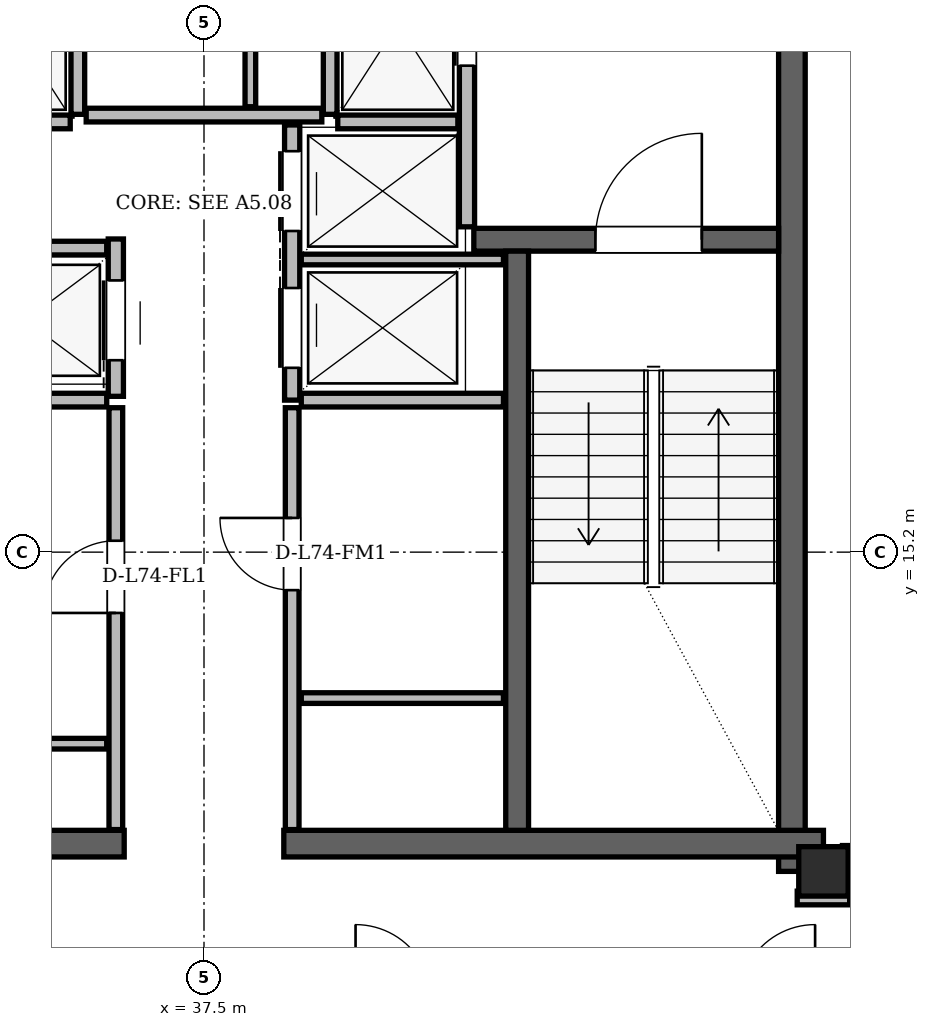
"""IFC4 building model, lengths in metres.
Left out: names, types, materials, properties, quantities, classifications, styles, units other than length and angle.
Written with IfcOpenShell. Run it as: python <this file> out.ifc"""

import sys

from ifc_helpers import new_model, si_unit, direction, frame, frame_2d, origin, origin_2d, place, context, subcontext, project, spatial, rectangle, hollow_rectangle, extrude, element, fill, save


model = new_model("IFC4")
c1 = context("Model", 3, precision=1e-05, world=origin(), true_north=direction((0.0, 1.0)))
c2 = subcontext(c1, "Body", "Model", "MODEL_VIEW")
j1 = project(units=[si_unit("LENGTHUNIT", "METRE"), si_unit("PLANEANGLEUNIT", "RADIAN")], contexts=[c1])
p1 = place(None, origin())
s1 = spatial("IfcSite", under=j1, at=p1, CompositionType="ELEMENT")
p2 = place(p1, origin())
s2 = spatial("IfcBuilding", under=s1, at=p2, CompositionType="ELEMENT")
p3 = place(p2, frame((0.0, 0.0, 281.1)))
s3 = spatial("IfcBuildingStorey", under=s2, at=p3, CompositionType="ELEMENT", Elevation=281.1)
p4 = place(p3, frame((45.65, 11.0, 0.0), z_axis=(0.0, 0.0, 1.0), x_axis=(1.0, 0.0, 0.0)))
e1 = element("IfcColumn", 1, at=p4, inside=s3, PredefinedType="COLUMN", context=c2, shape_type="SweptSolid", body=[
    extrude(hollow_rectangle(XDim=0.65, YDim=0.65, WallThickness=0.05, at=origin_2d()), origin(), (0.0, 0.0, 1.0), 3.9),
])
p5 = place(p3, frame((45.235, 11.0, 0.0), z_axis=(0.0, 0.0, 1.0), x_axis=(0.0, 1.0, 0.0)))
e2 = element("IfcWall", 2, at=p5, inside=s3, PredefinedType="SHEAR", context=c2, shape_type="SweptSolid", body=[
    extrude(rectangle(XDim=13.3, YDim=0.35, at=frame_2d((6.65, 0.0))), origin(), (0.0, 0.0, 1.0), 3.68),
])
for number, where, z_axis, x_axis in (
    (3, (29.35, 11.365, 0.0), (0.0, 0.0, 1.0), (1.0, 0.0, 0.0)),
    (4, (38.55, 11.365, 0.0), (0.0, 0.0, 1.0), (1.0, 0.0, 0.0)),
):
    element("IfcWall", number, at=place(p3, frame(where, z_axis=z_axis, x_axis=x_axis)), inside=s3, PredefinedType="SHEAR", context=c2, shape_type="SweptSolid", body=[
        extrude(rectangle(XDim=7.1, YDim=0.35, at=frame_2d((3.55, 0.0))), origin(), (0.0, 0.0, 1.0), 3.68),
    ])
p6 = place(p3, frame((41.05, 19.31, 0.0), z_axis=(0.0, 0.0, 1.0), x_axis=(1.0, 0.0, 0.0)))
e5 = element("IfcWall", 5, at=p6, inside=s3, PredefinedType="SHEAR", context=c2, shape_type="SweptSolid", body=[
    extrude(rectangle(XDim=4.01, YDim=0.3, at=frame_2d((2.005, 0.0))), origin(), (0.0, 0.0, 1.0), 3.68),
])
p7 = place(p6, frame((1.6, 0.0, 0.0)))
e6 = element("IfcOpeningElement", 6, at=p7, cuts=e5, PredefinedType="OPENING", context=c2, shape_type="SweptSolid", body=[
    extrude(rectangle(XDim=1.4, YDim=2.2, at=frame_2d((0.7, 1.1))), frame((0.0, 0.15, 0.0), z_axis=(0.0, -1.0, 0.0), x_axis=(1.0, 0.0, 0.0)), (0.0, 0.0, 1.0), 0.3),
])
p8 = place(p3, frame((41.62, 11.54, 0.0), z_axis=(0.0, 0.0, 1.0), x_axis=(0.0, 1.0, 0.0)))
e7 = element("IfcWall", 7, at=p8, inside=s3, PredefinedType="SHEAR", context=c2, shape_type="SweptSolid", body=[
    extrude(rectangle(XDim=7.62, YDim=0.3, at=frame_2d((3.81, 0.0))), origin(), (0.0, 0.0, 1.0), 3.68),
])
p9 = place(p3, frame((58.454, 10.584, 0.0), z_axis=(0.0, 0.0, 1.0), x_axis=(-0.500002460556, 0.866023983177, 0.0)))
e8 = element("IfcWall", 8, at=p9, inside=s3, PredefinedType="SOLIDWALL", context=c2, shape_type="SweptSolid", body=[
    extrude(rectangle(XDim=37.435, YDim=0.29, at=frame_2d((18.718, 0.0))), origin(), (0.0, 0.0, 1.0), 3.058),
])
p10 = place(p9, frame((3.639, 0.0, 0.0)))
e9 = element("IfcOpeningElement", 9, at=p10, cuts=e8, PredefinedType="OPENING", context=c2, shape_type="SweptSolid", body=[
    extrude(rectangle(XDim=1.5, YDim=2.2, at=frame_2d((0.75, 1.1))), frame((0.0, 0.145, 0.0), z_axis=(0.0, -1.0, 0.0), x_axis=(1.0, 0.0, 0.0)), (0.0, 0.0, 1.0), 0.29),
])
p11 = place(p9, frame((27.901, 0.0, 0.0)))
e10 = element("IfcOpeningElement", 10, at=p11, cuts=e8, PredefinedType="OPENING", context=c2, shape_type="SweptSolid", body=[
    extrude(rectangle(XDim=1.5, YDim=2.2, at=frame_2d((0.75, 1.1))), frame((0.0, 0.145, 0.0), z_axis=(0.0, -1.0, 0.0), x_axis=(1.0, 0.0, 0.0)), (0.0, 0.0, 1.0), 0.29),
])
p12 = place(p9, frame((0.782, 0.0, 0.85)))
e11 = element("IfcOpeningElement", 11, at=p12, cuts=e8, PredefinedType="OPENING", context=c2, shape_type="SweptSolid", body=[
    extrude(rectangle(XDim=1.2, YDim=1.48, at=frame_2d((0.6, 0.74))), frame((0.0, 0.145, 0.0), z_axis=(0.0, -1.0, 0.0), x_axis=(1.0, 0.0, 0.0)), (0.0, 0.0, 1.0), 0.29),
])
p13 = place(p9, frame((7.149, 0.0, 0.85)))
e12 = element("IfcOpeningElement", 12, at=p13, cuts=e8, PredefinedType="OPENING", context=c2, shape_type="SweptSolid", body=[
    extrude(rectangle(XDim=2.4, YDim=1.9, at=frame_2d((1.2, 0.95))), frame((0.0, 0.145, 0.0), z_axis=(0.0, -1.0, 0.0), x_axis=(1.0, 0.0, 0.0)), (0.0, 0.0, 1.0), 0.29),
])
p14 = place(p9, frame((35.38, 0.0, 0.85)))
e13 = element("IfcOpeningElement", 13, at=p14, cuts=e8, PredefinedType="OPENING", context=c2, shape_type="SweptSolid", body=[
    extrude(rectangle(XDim=1.2, YDim=1.48, at=frame_2d((0.6, 0.74))), frame((0.0, 0.145, 0.0), z_axis=(0.0, -1.0, 0.0), x_axis=(1.0, 0.0, 0.0)), (0.0, 0.0, 1.0), 0.29),
])
p15 = place(p9, frame((16.994, 0.0, 0.85)))
e14 = element("IfcOpeningElement", 14, at=p15, cuts=e8, PredefinedType="OPENING", context=c2, shape_type="SweptSolid", body=[
    extrude(rectangle(XDim=1.2, YDim=1.48, at=frame_2d((0.6, 0.74))), frame((0.0, 0.145, 0.0), z_axis=(0.0, -1.0, 0.0), x_axis=(1.0, 0.0, 0.0)), (0.0, 0.0, 1.0), 0.29),
])
p16 = place(p9, frame((19.423, 0.0, 0.85)))
e15 = element("IfcOpeningElement", 15, at=p16, cuts=e8, PredefinedType="OPENING", context=c2, shape_type="SweptSolid", body=[
    extrude(rectangle(XDim=1.8, YDim=1.75, at=frame_2d((0.9, 0.875))), frame((0.0, 0.145, 0.0), z_axis=(0.0, -1.0, 0.0), x_axis=(1.0, 0.0, 0.0)), (0.0, 0.0, 1.0), 0.29),
])
p17 = place(p9, frame((22.626, 0.0, 0.85)))
e16 = element("IfcOpeningElement", 16, at=p17, cuts=e8, PredefinedType="OPENING", context=c2, shape_type="SweptSolid", body=[
    extrude(rectangle(XDim=2.2, YDim=1.85, at=frame_2d((1.1, 0.925))), frame((0.0, 0.145, 0.0), z_axis=(0.0, -1.0, 0.0), x_axis=(1.0, 0.0, 0.0)), (0.0, 0.0, 1.0), 0.29),
])
p18 = place(p9, frame((14.598, 0.0, 0.85)))
e17 = element("IfcOpeningElement", 17, at=p18, cuts=e8, PredefinedType="OPENING", context=c2, shape_type="SweptSolid", body=[
    extrude(rectangle(XDim=1.2, YDim=1.48, at=frame_2d((0.6, 0.74))), frame((0.0, 0.145, 0.0), z_axis=(0.0, -1.0, 0.0), x_axis=(1.0, 0.0, 0.0)), (0.0, 0.0, 1.0), 0.29),
])
p19 = place(p3, frame((35.84, 20.96, 0.0), z_axis=(0.0, 0.0, 1.0), x_axis=(0.0, 1.0, 0.0)))
e18 = element("IfcWall", 18, at=p19, inside=s3, PredefinedType="PARTITIONING", context=c2, shape_type="SweptSolid", body=[
    extrude(rectangle(XDim=3.02, YDim=0.18, at=frame_2d((1.51, 0.0))), origin(), (0.0, 0.0, 1.0), 3.68),
])
p20 = place(p3, frame((34.16, 20.86, 0.0), z_axis=(0.0, 0.0, 1.0), x_axis=(1.0, 0.0, 0.0)))
e19 = element("IfcWall", 19, at=p20, inside=s3, PredefinedType="PARTITIONING", context=c2, shape_type="SweptSolid", body=[
    extrude(rectangle(XDim=1.58, YDim=0.18, at=frame_2d((0.79, 0.0))), origin(), (0.0, 0.0, 1.0), 3.68),
])
p21 = place(p3, frame((40.96, 19.48, 0.0), z_axis=(0.0, 0.0, 1.0), x_axis=(0.0, 1.0, 0.0)))
e20 = element("IfcWall", 20, at=p21, inside=s3, PredefinedType="PARTITIONING", context=c2, shape_type="SweptSolid", body=[
    extrude(rectangle(XDim=4.5, YDim=0.2, at=frame_2d((2.25, 0.0))), origin(), (0.0, 0.0, 1.0), 3.68),
])
p22 = place(p21, frame((2.12, 0.0, 0.0)))
e21 = element("IfcOpeningElement", 21, at=p22, cuts=e20, PredefinedType="OPENING", context=c2, shape_type="SweptSolid", body=[
    extrude(rectangle(XDim=1.1, YDim=2.2, at=frame_2d((0.55, 1.1))), frame((0.0, 0.1, 0.0), z_axis=(0.0, -1.0, 0.0), x_axis=(1.0, 0.0, 0.0)), (0.0, 0.0, 1.0), 0.2),
])
p23 = place(p3, frame((39.16, 20.96, 0.0), z_axis=(0.0, 0.0, 1.0), x_axis=(0.0, 1.0, 0.0)))
e22 = element("IfcWall", 22, at=p23, inside=s3, PredefinedType="PARTITIONING", context=c2, shape_type="SweptSolid", body=[
    extrude(rectangle(XDim=3.02, YDim=0.18, at=frame_2d((1.51, 0.0))), origin(), (0.0, 0.0, 1.0), 3.68),
])
p24 = place(p3, frame((39.26, 20.86, 0.0), z_axis=(0.0, 0.0, 1.0), x_axis=(1.0, 0.0, 0.0)))
e23 = element("IfcWall", 23, at=p24, inside=s3, PredefinedType="PARTITIONING", context=c2, shape_type="SweptSolid", body=[
    extrude(rectangle(XDim=1.58, YDim=0.18, at=frame_2d((0.79, 0.0))), origin(), (0.0, 0.0, 1.0), 3.68),
])
p25 = place(p3, frame((36.34, 17.25, 0.0), z_axis=(0.0, 0.0, 1.0), x_axis=(0.0, 1.0, 0.0)))
e24 = element("IfcWall", 24, at=p25, inside=s3, PredefinedType="PARTITIONING", context=c2, shape_type="SweptSolid", body=[
    extrude(rectangle(XDim=2.07, YDim=0.2, at=frame_2d((1.035, 0.0))), origin(), (0.0, 0.0, 1.0), 3.68),
])
p26 = place(p25, frame((0.475, 0.0, 0.0)))
e25 = element("IfcOpeningElement", 25, at=p26, cuts=e24, PredefinedType="OPENING", context=c2, shape_type="SweptSolid", body=[
    extrude(rectangle(XDim=1.05, YDim=2.15, at=frame_2d((0.525, 1.075))), frame((0.0, 0.1, 0.0), z_axis=(0.0, -1.0, 0.0), x_axis=(1.0, 0.0, 0.0)), (0.0, 0.0, 1.0), 0.2),
])
p27 = place(p3, frame((33.95, 19.2, 0.0), z_axis=(0.0, 0.0, 1.0), x_axis=(1.0, 0.0, 0.0)))
e26 = element("IfcWall", 26, at=p27, inside=s3, PredefinedType="PARTITIONING", context=c2, shape_type="SweptSolid", body=[
    extrude(rectangle(XDim=2.27, YDim=0.18, at=frame_2d((1.135, 0.0))), origin(), (0.0, 0.0, 1.0), 3.68),
])
p28 = place(p3, frame((33.56, 17.2, 0.0), z_axis=(0.0, 0.0, 1.0), x_axis=(1.0, 0.0, 0.0)))
e27 = element("IfcWall", 27, at=p28, inside=s3, PredefinedType="PARTITIONING", context=c2, shape_type="SweptSolid", body=[
    extrude(rectangle(XDim=2.66, YDim=0.18, at=frame_2d((1.33, 0.0))), origin(), (0.0, 0.0, 1.0), 3.68),
])
p29 = place(p3, frame((36.34, 11.55, 0.0), z_axis=(0.0, 0.0, 1.0), x_axis=(0.0, 1.0, 0.0)))
e28 = element("IfcWall", 28, at=p29, inside=s3, PredefinedType="PARTITIONING", context=c2, shape_type="SweptSolid", body=[
    extrude(rectangle(XDim=5.55, YDim=0.18, at=frame_2d((2.775, 0.0))), origin(), (0.0, 0.0, 1.0), 3.68),
])
p30 = place(p29, frame((2.85, 0.0, 0.0)))
e29 = element("IfcOpeningElement", 29, at=p30, cuts=e28, PredefinedType="OPENING", context=c2, shape_type="SweptSolid", body=[
    extrude(rectangle(XDim=0.95, YDim=2.1, at=frame_2d((0.475, 1.05))), frame((0.0, 0.09, 0.0), z_axis=(0.0, -1.0, 0.0), x_axis=(1.0, 0.0, 0.0)), (0.0, 0.0, 1.0), 0.18),
])
p31 = place(p3, frame((33.56, 12.68, 0.0), z_axis=(0.0, 0.0, 1.0), x_axis=(1.0, 0.0, 0.0)))
e30 = element("IfcWall", 30, at=p31, inside=s3, PredefinedType="PARTITIONING", context=c2, shape_type="SweptSolid", body=[
    extrude(rectangle(XDim=2.66, YDim=0.14, at=frame_2d((1.33, 0.0))), origin(), (0.0, 0.0, 1.0), 3.68),
])
p32 = place(p3, frame((38.66, 17.2, 0.0), z_axis=(0.0, 0.0, 1.0), x_axis=(0.0, 1.0, 0.0)))
e31 = element("IfcWall", 31, at=p32, inside=s3, PredefinedType="PARTITIONING", context=c2, shape_type="SweptSolid", body=[
    extrude(rectangle(XDim=3.62, YDim=0.2, at=frame_2d((1.81, 0.0))), origin(), (0.0, 0.0, 1.0), 3.68),
])
p33 = place(p32, frame((0.425, 0.0, 0.0)))
e32 = element("IfcOpeningElement", 32, at=p33, cuts=e31, PredefinedType="OPENING", context=c2, shape_type="SweptSolid", body=[
    extrude(rectangle(XDim=1.05, YDim=2.15, at=frame_2d((0.525, 1.075))), frame((0.0, 0.1, 0.0), z_axis=(0.0, -1.0, 0.0), x_axis=(1.0, 0.0, 0.0)), (0.0, 0.0, 1.0), 0.2),
])
p34 = place(p32, frame((2.225, 0.0, 0.0)))
e33 = element("IfcOpeningElement", 33, at=p34, cuts=e31, PredefinedType="OPENING", context=c2, shape_type="SweptSolid", body=[
    extrude(rectangle(XDim=1.05, YDim=2.15, at=frame_2d((0.525, 1.075))), frame((0.0, 0.1, 0.0), z_axis=(0.0, -1.0, 0.0), x_axis=(1.0, 0.0, 0.0)), (0.0, 0.0, 1.0), 0.2),
])
p35 = place(p3, frame((38.78, 17.2, 0.0), z_axis=(0.0, 0.0, 1.0), x_axis=(1.0, 0.0, 0.0)))
e34 = element("IfcWall", 34, at=p35, inside=s3, PredefinedType="PARTITIONING", context=c2, shape_type="SweptSolid", body=[
    extrude(rectangle(XDim=2.66, YDim=0.18, at=frame_2d((1.33, 0.0))), origin(), (0.0, 0.0, 1.0), 3.68),
])
p36 = place(p3, frame((38.78, 19.05, 0.0), z_axis=(0.0, 0.0, 1.0), x_axis=(1.0, 0.0, 0.0)))
e35 = element("IfcWall", 35, at=p36, inside=s3, PredefinedType="PARTITIONING", context=c2, shape_type="SweptSolid", body=[
    extrude(rectangle(XDim=2.66, YDim=0.14, at=frame_2d((1.33, 0.0))), origin(), (0.0, 0.0, 1.0), 3.68),
])
p37 = place(p3, frame((38.66, 11.55, 0.0), z_axis=(0.0, 0.0, 1.0), x_axis=(0.0, 1.0, 0.0)))
e36 = element("IfcWall", 36, at=p37, inside=s3, PredefinedType="PARTITIONING", context=c2, shape_type="SweptSolid", body=[
    extrude(rectangle(XDim=5.55, YDim=0.18, at=frame_2d((2.775, 0.0))), origin(), (0.0, 0.0, 1.0), 3.68),
])
p38 = place(p37, frame((3.15, 0.0, 0.0)))
e37 = element("IfcOpeningElement", 37, at=p38, cuts=e36, PredefinedType="OPENING", context=c2, shape_type="SweptSolid", body=[
    extrude(rectangle(XDim=0.95, YDim=2.1, at=frame_2d((0.475, 1.05))), frame((0.0, 0.09, 0.0), z_axis=(0.0, -1.0, 0.0), x_axis=(1.0, 0.0, 0.0)), (0.0, 0.0, 1.0), 0.18),
])
p39 = place(p3, frame((38.78, 13.28, 0.0), z_axis=(0.0, 0.0, 1.0), x_axis=(1.0, 0.0, 0.0)))
e38 = element("IfcWall", 38, at=p39, inside=s3, PredefinedType="PARTITIONING", context=c2, shape_type="SweptSolid", body=[
    extrude(rectangle(XDim=2.66, YDim=0.14, at=frame_2d((1.33, 0.0))), origin(), (0.0, 0.0, 1.0), 3.68),
])
p40 = place(p3, frame((35.95, 20.95, 0.0), z_axis=(0.0, 0.0, 1.0), x_axis=(1.0, 0.0, 0.0)))
e39 = element("IfcWall", 39, at=p40, inside=s3, PredefinedType="PARTITIONING", context=c2, shape_type="SweptSolid", body=[
    extrude(rectangle(XDim=3.1, YDim=0.18, at=frame_2d((1.55, 0.0))), origin(), (0.0, 0.0, 1.0), 3.68),
])
p41 = place(p3, frame((38.11, 21.06, 0.0), z_axis=(0.0, 0.0, 1.0), x_axis=(0.0, 1.0, 0.0)))
e40 = element("IfcWall", 40, at=p41, inside=s3, PredefinedType="PARTITIONING", context=c2, shape_type="SweptSolid", body=[
    extrude(rectangle(XDim=2.92, YDim=0.14, at=frame_2d((1.46, 0.0))), origin(), (0.0, 0.0, 1.0), 3.68),
])
p42 = place(p3, frame((45.305, 10.65, 0.0), z_axis=(0.0, 0.0, 1.0), x_axis=(1.0, 0.0, 0.0)))
e41 = element("IfcWall", 41, at=p42, inside=s3, PredefinedType="PARTITIONING", context=c2, shape_type="SweptSolid", body=[
    extrude(rectangle(XDim=0.69, YDim=0.18, at=frame_2d((0.345, 0.0))), origin(), (0.0, 0.0, 1.0), 3.68),
])
p43 = place(p3, frame((45.99, 10.95, 0.0), z_axis=(0.0, 0.0, 1.0), x_axis=(0.0, 1.0, 0.0)))
e42 = element("IfcWall", 42, at=p43, inside=s3, PredefinedType="PARTITIONING", context=c2, shape_type="SweptSolid", body=[
    extrude(rectangle(XDim=0.39, YDim=0.18, at=frame_2d((0.195, 0.0))), origin(), (0.0, 0.0, 1.0), 3.68),
])
p44 = place(p30, origin())
e43 = element("IfcDoor", 43, at=p44, inside=s3, OperationType="SINGLE_SWING_LEFT", PredefinedType="DOOR", context=c2, shape_type="SweptSolid", body=[
    extrude(rectangle(XDim=0.95, YDim=2.1, at=frame_2d((0.475, 1.05))), frame((0.0, 0.025, 0.0), z_axis=(0.0, -1.0, 0.0), x_axis=(1.0, 0.0, 0.0)), (0.0, 0.0, 1.0), 0.05),
])
fill(e29, e43)
p45 = place(p38, origin())
e44 = element("IfcDoor", 44, at=p45, inside=s3, OperationType="SINGLE_SWING_RIGHT", PredefinedType="DOOR", context=c2, shape_type="SweptSolid", body=[
    extrude(rectangle(XDim=0.95, YDim=2.1, at=frame_2d((0.475, 1.05))), frame((0.0, 0.025, 0.0), z_axis=(0.0, -1.0, 0.0), x_axis=(1.0, 0.0, 0.0)), (0.0, 0.0, 1.0), 0.05),
])
fill(e37, e44)
p46 = place(p22, origin())
e45 = element("IfcDoor", 45, at=p46, inside=s3, OperationType="SLIDING_TO_RIGHT", PredefinedType="DOOR", context=c2, shape_type="SweptSolid", body=[
    extrude(rectangle(XDim=1.1, YDim=2.2, at=frame_2d((0.55, 1.1))), frame((0.0, 0.025, 0.0), z_axis=(0.0, -1.0, 0.0), x_axis=(1.0, 0.0, 0.0)), (0.0, 0.0, 1.0), 0.05),
])
fill(e21, e45)
p47 = place(p26, origin())
e46 = element("IfcDoor", 46, at=p47, inside=s3, OperationType="SLIDING_TO_LEFT", PredefinedType="DOOR", context=c2, shape_type="SweptSolid", body=[
    extrude(rectangle(XDim=1.05, YDim=2.15, at=frame_2d((0.525, 1.075))), frame((0.0, 0.025, 0.0), z_axis=(0.0, -1.0, 0.0), x_axis=(1.0, 0.0, 0.0)), (0.0, 0.0, 1.0), 0.05),
])
fill(e25, e46)
p48 = place(p33, origin())
e47 = element("IfcDoor", 47, at=p48, inside=s3, OperationType="SLIDING_TO_RIGHT", PredefinedType="DOOR", context=c2, shape_type="SweptSolid", body=[
    extrude(rectangle(XDim=1.05, YDim=2.15, at=frame_2d((0.525, 1.075))), frame((0.0, 0.025, 0.0), z_axis=(0.0, -1.0, 0.0), x_axis=(1.0, 0.0, 0.0)), (0.0, 0.0, 1.0), 0.05),
])
fill(e32, e47)
p49 = place(p34, origin())
e48 = element("IfcDoor", 48, at=p49, inside=s3, OperationType="SLIDING_TO_LEFT", PredefinedType="DOOR", context=c2, shape_type="SweptSolid", body=[
    extrude(rectangle(XDim=1.05, YDim=2.15, at=frame_2d((0.525, 1.075))), frame((0.0, 0.025, 0.0), z_axis=(0.0, -1.0, 0.0), x_axis=(1.0, 0.0, 0.0)), (0.0, 0.0, 1.0), 0.05),
])
fill(e33, e48)
p50 = place(p7, origin())
e49 = element("IfcDoor", 49, at=p50, inside=s3, OperationType="SINGLE_SWING_RIGHT", PredefinedType="DOOR", context=c2, shape_type="SweptSolid", body=[
    extrude(rectangle(XDim=1.4, YDim=2.2, at=frame_2d((0.7, 1.1))), frame((0.0, 0.025, 0.0), z_axis=(0.0, -1.0, 0.0), x_axis=(1.0, 0.0, 0.0)), (0.0, 0.0, 1.0), 0.05),
])
fill(e6, e49)
save(model, sys.argv[1])
